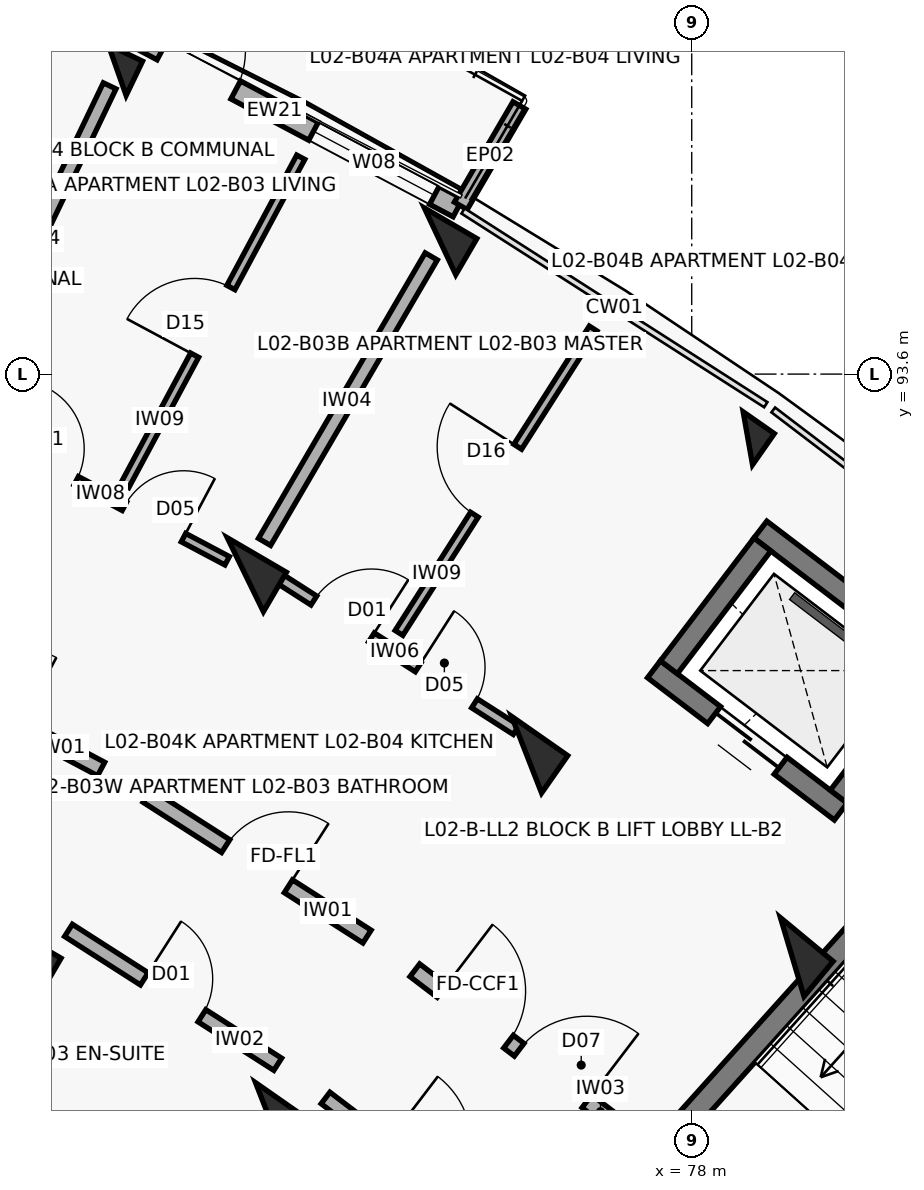
"""IFC4 building model, lengths in metres.
Left out: names, types, materials, properties, quantities, classifications, styles, units other than length and angle.
Written with IfcOpenShell. Run it as: python <this file> out.ifc"""

import sys

from ifc_helpers import new_model, si_unit, direction, frame, frame_2d, origin, origin_2d, place, context, subcontext, project, spatial, rectangle, extrude, element, fill, save


model = new_model("IFC4")
c1 = context("Model", 3, precision=1e-05, world=origin(), true_north=direction((0.0, 1.0)))
c2 = subcontext(c1, "Body", "Model", "MODEL_VIEW")
j1 = project(units=[si_unit("LENGTHUNIT", "METRE"), si_unit("PLANEANGLEUNIT", "RADIAN")], contexts=[c1])
p1 = place(None, origin())
s1 = spatial("IfcSite", under=j1, at=p1, CompositionType="ELEMENT")
p2 = place(p1, origin())
s2 = spatial("IfcBuilding", under=s1, at=p2, CompositionType="ELEMENT")
p3 = place(p2, frame((0.0, 0.0, 8.1)))
s3 = spatial("IfcBuildingStorey", under=s2, at=p3, CompositionType="ELEMENT", Elevation=8.1)
p4 = place(p3, frame((70.441, 97.6, 0.0), z_axis=(0.0, 0.0, 1.0), x_axis=(0.432085748802, 0.901832526405, 0.0)))
e1 = element("IfcColumn", 1, at=p4, inside=s3, PredefinedType="COLUMN", context=c2, shape_type="SweptSolid", body=[
    extrude(rectangle(XDim=0.5, YDim=0.5, at=origin_2d()), origin(), (0.0, 0.0, 1.0), 3.1),
])
for number, where, z_axis, x_axis in (
    (2, (69.163, 85.882, 0.0), (0.0, 0.0, 1.0), (0.504, 0.864, 0.0)),
    (3, (72.127, 90.96, 0.0), (0.0, 0.0, 1.0), (0.504, 0.864, 0.0)),
):
    element("IfcColumn", number, at=place(p3, frame(where, z_axis=z_axis, x_axis=x_axis)), inside=s3, PredefinedType="COLUMN", context=c2, shape_type="SweptSolid", body=[
        extrude(rectangle(XDim=0.6, YDim=0.9, at=origin_2d()), origin(), (0.0, 0.0, 1.0), 3.1),
    ])
p5 = place(p3, frame((74.689, 95.347, 0.0), z_axis=(0.0, 0.0, 1.0), x_axis=(0.504226211181, 0.863571611366, 0.0)))
e4 = element("IfcColumn", 4, at=p5, inside=s3, PredefinedType="COLUMN", context=c2, shape_type="SweptSolid", body=[
    extrude(rectangle(XDim=0.55, YDim=0.8, at=origin_2d()), origin(), (0.0, 0.0, 1.0), 3.1),
])
for number, where, z_axis, x_axis in (
    (5, (72.458, 83.773, 0.0), (0.0, 0.0, 1.0), (0.573, 0.82, 0.0)),
    (6, (75.828, 88.592, 0.0), (0.0, 0.0, 1.0), (0.573, 0.82, 0.0)),
):
    element("IfcColumn", number, at=place(p3, frame(where, z_axis=z_axis, x_axis=x_axis)), inside=s3, PredefinedType="COLUMN", context=c2, shape_type="SweptSolid", body=[
        extrude(rectangle(XDim=0.6, YDim=0.9, at=origin_2d()), origin(), (0.0, 0.0, 1.0), 3.1),
    ])
p6 = place(p3, frame((78.739, 92.755, 0.0), z_axis=(0.0, 0.0, 1.0), x_axis=(0.573004420611, 0.819552276527, 0.0)))
e7 = element("IfcColumn", 7, at=p6, inside=s3, PredefinedType="COLUMN", context=c2, shape_type="SweptSolid", body=[
    extrude(rectangle(XDim=0.5, YDim=0.5, at=origin_2d()), origin(), (0.0, 0.0, 1.0), 3.1),
])
p7 = place(p3, frame((79.322, 85.93, 0.0), z_axis=(0.0, 0.0, 1.0), x_axis=(0.637961754089, 0.770068049148, 0.0)))
e8 = element("IfcColumn", 8, at=p7, inside=s3, PredefinedType="COLUMN", context=c2, shape_type="SweptSolid", body=[
    extrude(rectangle(XDim=0.6, YDim=0.9, at=origin_2d()), origin(), (0.0, 0.0, 1.0), 3.1),
])
p8 = place(p3, frame((70.675, 98.042, 0.0), z_axis=(0.0, 0.0, 1.0), x_axis=(0.883448093208, -0.468529045639, 0.0)))
e9 = element("IfcWall", 9, at=p8, inside=s3, PredefinedType="SOLIDWALL", context=c2, shape_type="SweptSolid", body=[
    extrude(rectangle(XDim=4.809, YDim=0.268, at=frame_2d((2.405, 0.0))), origin(), (0.0, 0.0, 1.0), 2.25),
])
p9 = place(p8, frame((0.4, 0.0, 0.0)))
e10 = element("IfcOpeningElement", 10, at=p9, cuts=e9, PredefinedType="OPENING", context=c2, shape_type="SweptSolid", body=[
    extrude(rectangle(XDim=1.1, YDim=2.15, at=frame_2d((0.55, 1.075))), frame((0.0, 0.144, 0.0), z_axis=(0.0, -1.0, 0.0), x_axis=(1.0, 0.0, 0.0)), (0.0, 0.0, 1.0), 0.288),
])
p10 = place(p8, frame((2.659, 0.0, 0.35)))
e11 = element("IfcOpeningElement", 11, at=p10, cuts=e9, PredefinedType="OPENING", context=c2, shape_type="SweptSolid", body=[
    extrude(rectangle(XDim=1.8, YDim=1.65, at=frame_2d((0.9, 0.825))), frame((0.0, 0.144, 0.0), z_axis=(0.0, -1.0, 0.0), x_axis=(1.0, 0.0, 0.0)), (0.0, 0.0, 1.0), 0.288),
])
p11 = place(p3, frame((74.961, 95.813, 0.0), z_axis=(0.0, 0.0, 1.0), x_axis=(0.504228145431, 0.863570481985, 0.0)))
e12 = element("IfcWall", 12, at=p11, inside=s3, PredefinedType="PARAPET", context=c2, shape_type="SweptSolid", body=[
    extrude(rectangle(XDim=1.53, YDim=0.195, at=frame_2d((0.765, 0.0))), origin(), (0.0, 0.0, 1.0), 2.25),
])
p12 = place(p3, frame((77.655, 83.461, 0.0), z_axis=(0.0, 0.0, 1.0), x_axis=(0.668868253964, 0.743380964808, 0.0)))
e13 = element("IfcWall", 13, at=p12, inside=s3, PredefinedType="SHEAR", context=c2, shape_type="SweptSolid", body=[
    extrude(rectangle(XDim=7.69, YDim=0.3, at=frame_2d((3.845, 0.0))), origin(), (0.0, 0.0, 1.0), 3.1),
])
p13 = place(p3, frame((79.961, 87.844, 0.0), z_axis=(0.0, 0.0, 1.0), x_axis=(-0.795464365424, 0.606000365793, 0.0)))
e14 = element("IfcWall", 14, at=p13, inside=s3, PredefinedType="SHEAR", context=c2, shape_type="SweptSolid", body=[
    extrude(rectangle(XDim=3.09, YDim=0.28, at=frame_2d((1.545, 0.0))), origin(), (0.0, 0.0, 1.0), 3.1),
])
p14 = place(p13, frame((0.995, 0.0, 0.0)))
e15 = element("IfcOpeningElement", 15, at=p14, cuts=e14, PredefinedType="OPENING", context=c2, shape_type="SweptSolid", body=[
    extrude(rectangle(XDim=1.1, YDim=2.15, at=frame_2d((0.55, 1.075))), frame((0.0, 0.15, 0.0), z_axis=(0.0, -1.0, 0.0), x_axis=(1.0, 0.0, 0.0)), (0.0, 0.0, 1.0), 0.3),
])
p15 = place(p3, frame((81.361, 89.681, 0.0), z_axis=(0.0, 0.0, 1.0), x_axis=(-0.795502452183, 0.605950368076, 0.0)))
e16 = element("IfcWall", 16, at=p15, inside=s3, PredefinedType="SHEAR", context=c2, shape_type="SweptSolid", body=[
    extrude(rectangle(XDim=3.09, YDim=0.28, at=frame_2d((1.545, 0.0))), origin(), (0.0, 0.0, 1.0), 3.1),
])
for number, where, z_axis, x_axis in (
    (17, (79.935, 88.04, 0.0), (0.0, 0.0, 1.0), (0.606, 0.795, 0.0)),
    (18, (77.699, 89.743, 0.0), (0.0, 0.0, 1.0), (0.606, 0.795, 0.0)),
):
    element("IfcWall", number, at=place(p3, frame(where, z_axis=z_axis, x_axis=x_axis)), inside=s3, PredefinedType="SHEAR", context=c2, shape_type="SweptSolid", body=[
        extrude(rectangle(XDim=2.03, YDim=0.28, at=frame_2d((1.015, 0.0))), origin(), (0.0, 0.0, 1.0), 3.1),
    ])
p16 = place(p3, frame((67.194, 90.014, 0.0), z_axis=(0.0, 0.0, 1.0), x_axis=(0.883410853063, -0.468599258099, 0.0)))
e19 = element("IfcWall", 19, at=p16, inside=s3, PredefinedType="SOLIDWALL", context=c2, shape_type="SweptSolid", body=[
    extrude(rectangle(XDim=3.436, YDim=0.2, at=frame_2d((1.718, 0.0))), origin(), (0.0, 0.0, 1.0), 2.08),
])
p17 = place(p16, frame((1.208, 0.0, 0.0)))
e20 = element("IfcOpeningElement", 20, at=p17, cuts=e19, PredefinedType="OPENING", context=c2, shape_type="SweptSolid", body=[
    extrude(rectangle(XDim=1.02, YDim=2.15, at=frame_2d((0.51, 1.075))), frame((0.0, 0.11, 0.0), z_axis=(0.0, -1.0, 0.0), x_axis=(1.0, 0.0, 0.0)), (0.0, 0.0, 1.0), 0.22),
])
p18 = place(p3, frame((68.533, 92.923, 0.0), z_axis=(0.0, 0.0, 1.0), x_axis=(0.88341855112, -0.46858474531, 0.0)))
e21 = element("IfcWall", 21, at=p18, inside=s3, PredefinedType="PARTITIONING", context=c2, shape_type="SweptSolid", body=[
    extrude(rectangle(XDim=3.797, YDim=0.125, at=frame_2d((1.898, 0.0))), origin(), (0.0, 0.0, 1.0), 2.08),
])
p19 = place(p18, frame((0.65, 0.0, 0.0)))
e22 = element("IfcOpeningElement", 22, at=p19, cuts=e21, PredefinedType="OPENING", context=c2, shape_type="SweptSolid", body=[
    extrude(rectangle(XDim=0.9, YDim=2.1, at=frame_2d((0.45, 1.05))), frame((0.0, 0.073, 0.0), z_axis=(0.0, -1.0, 0.0), x_axis=(1.0, 0.0, 0.0)), (0.0, 0.0, 1.0), 0.145),
])
p20 = place(p18, frame((2.267, 0.0, 0.0)))
e23 = element("IfcOpeningElement", 23, at=p20, cuts=e21, PredefinedType="OPENING", context=c2, shape_type="SweptSolid", body=[
    extrude(rectangle(XDim=0.88, YDim=2.1, at=frame_2d((0.44, 1.05))), frame((0.0, 0.073, 0.0), z_axis=(0.0, -1.0, 0.0), x_axis=(1.0, 0.0, 0.0)), (0.0, 0.0, 1.0), 0.145),
])
p21 = place(p3, frame((70.541, 92.135, 0.0), z_axis=(0.0, 0.0, 1.0), x_axis=(0.472542158723, 0.881308066586, 0.0)))
e24 = element("IfcWall", 24, at=p21, inside=s3, PredefinedType="PARTITIONING", context=c2, shape_type="SweptSolid", body=[
    extrude(rectangle(XDim=4.9, YDim=0.12, at=frame_2d((2.45, 0.0))), origin(), (0.0, 0.0, 1.0), 2.08),
])
p22 = place(p21, frame((1.945, 0.0, 0.0)))
e25 = element("IfcOpeningElement", 25, at=p22, cuts=e24, PredefinedType="OPENING", context=c2, shape_type="SweptSolid", body=[
    extrude(rectangle(XDim=1.01, YDim=2.1, at=frame_2d((0.505, 1.05))), frame((0.0, 0.07, 0.0), z_axis=(0.0, -1.0, 0.0), x_axis=(1.0, 0.0, 0.0)), (0.0, 0.0, 1.0), 0.14),
])
p23 = place(p3, frame((68.462, 93.469, 0.0), z_axis=(0.0, 0.0, 1.0), x_axis=(0.432086898897, 0.901831975371, 0.0)))
e26 = element("IfcWall", 26, at=p23, inside=s3, PredefinedType="SOLIDWALL", context=c2, shape_type="SweptSolid", body=[
    extrude(rectangle(XDim=4.35, YDim=0.185, at=frame_2d((2.175, 0.0))), origin(), (0.0, 0.0, 1.0), 2.08),
])
p24 = place(p3, frame((70.834, 88.051, 0.0), z_axis=(0.0, 0.0, 1.0), x_axis=(0.842257205985, -0.539075874963, 0.0)))
e27 = element("IfcWall", 27, at=p24, inside=s3, PredefinedType="SOLIDWALL", context=c2, shape_type="SweptSolid", body=[
    extrude(rectangle(XDim=3.436, YDim=0.2, at=frame_2d((1.718, 0.0))), origin(), (0.0, 0.0, 1.0), 2.08),
])
p25 = place(p24, frame((1.228, 0.0, 0.0)))
e28 = element("IfcOpeningElement", 28, at=p25, cuts=e27, PredefinedType="OPENING", context=c2, shape_type="SweptSolid", body=[
    extrude(rectangle(XDim=0.98, YDim=2.15, at=frame_2d((0.49, 1.075))), frame((0.0, 0.11, 0.0), z_axis=(0.0, -1.0, 0.0), x_axis=(1.0, 0.0, 0.0)), (0.0, 0.0, 1.0), 0.22),
])
p26 = place(p3, frame((69.8, 86.281, 0.0), z_axis=(0.0, 0.0, 1.0), x_axis=(0.842225276846, -0.539125758095, 0.0)))
e29 = element("IfcWall", 29, at=p26, inside=s3, PredefinedType="SOLIDWALL", context=c2, shape_type="SweptSolid", body=[
    extrude(rectangle(XDim=3.269, YDim=0.19, at=frame_2d((1.634, 0.0))), origin(), (0.0, 0.0, 1.0), 2.08),
])
p27 = place(p26, frame((1.184, 0.0, 0.0)))
e30 = element("IfcOpeningElement", 30, at=p27, cuts=e29, PredefinedType="OPENING", context=c2, shape_type="SweptSolid", body=[
    extrude(rectangle(XDim=0.9, YDim=2.1, at=frame_2d((0.45, 1.05))), frame((0.0, 0.105, 0.0), z_axis=(0.0, -1.0, 0.0), x_axis=(1.0, 0.0, 0.0)), (0.0, 0.0, 1.0), 0.21),
])
p28 = place(p3, frame((72.481, 90.971, 0.0), z_axis=(0.0, 0.0, 1.0), x_axis=(0.842238809758, -0.53910461632, 0.0)))
e31 = element("IfcWall", 31, at=p28, inside=s3, PredefinedType="PARTITIONING", context=c2, shape_type="SweptSolid", body=[
    extrude(rectangle(XDim=3.81, YDim=0.14, at=frame_2d((1.905, 0.0))), origin(), (0.0, 0.0, 1.0), 2.08),
])
p29 = place(p28, frame((0.65, 0.0, 0.0)))
e32 = element("IfcOpeningElement", 32, at=p29, cuts=e31, PredefinedType="OPENING", context=c2, shape_type="SweptSolid", body=[
    extrude(rectangle(XDim=0.9, YDim=2.1, at=frame_2d((0.45, 1.05))), frame((0.0, 0.08, 0.0), z_axis=(0.0, -1.0, 0.0), x_axis=(1.0, 0.0, 0.0)), (0.0, 0.0, 1.0), 0.16),
])
p30 = place(p28, frame((2.28, 0.0, 0.0)))
e33 = element("IfcOpeningElement", 33, at=p30, cuts=e31, PredefinedType="OPENING", context=c2, shape_type="SweptSolid", body=[
    extrude(rectangle(XDim=0.88, YDim=2.1, at=frame_2d((0.44, 1.05))), frame((0.0, 0.08, 0.0), z_axis=(0.0, -1.0, 0.0), x_axis=(1.0, 0.0, 0.0)), (0.0, 0.0, 1.0), 0.16),
])
p31 = place(p3, frame((74.148, 90.195, 0.0), z_axis=(0.0, 0.0, 1.0), x_axis=(0.537779792606, 0.843085342456, 0.0)))
e34 = element("IfcWall", 34, at=p31, inside=s3, PredefinedType="PARTITIONING", context=c2, shape_type="SweptSolid", body=[
    extrude(rectangle(XDim=4.75, YDim=0.12, at=frame_2d((2.375, 0.0))), origin(), (0.0, 0.0, 1.0), 2.08),
])
p32 = place(p31, frame((1.845, 0.0, 0.0)))
e35 = element("IfcOpeningElement", 35, at=p32, cuts=e34, PredefinedType="OPENING", context=c2, shape_type="SweptSolid", body=[
    extrude(rectangle(XDim=1.06, YDim=2.1, at=frame_2d((0.53, 1.05))), frame((0.0, 0.07, 0.0), z_axis=(0.0, -1.0, 0.0), x_axis=(1.0, 0.0, 0.0)), (0.0, 0.0, 1.0), 0.14),
])
p33 = place(p3, frame((72.379, 91.392, 0.0), z_axis=(0.0, 0.0, 1.0), x_axis=(0.504216452091, 0.863577309475, 0.0)))
e36 = element("IfcWall", 36, at=p33, inside=s3, PredefinedType="SOLIDWALL", context=c2, shape_type="SweptSolid", body=[
    extrude(rectangle(XDim=4.35, YDim=0.185, at=frame_2d((2.175, 0.0))), origin(), (0.0, 0.0, 1.0), 2.08),
])
p34 = place(p3, frame((74.357, 85.756, 0.0), z_axis=(0.0, 0.0, 1.0), x_axis=(0.795498026433, -0.605956178235, 0.0)))
e37 = element("IfcWall", 37, at=p34, inside=s3, PredefinedType="SOLIDWALL", context=c2, shape_type="SweptSolid", body=[
    extrude(rectangle(XDim=3.296, YDim=0.21, at=frame_2d((1.648, 0.0))), origin(), (0.0, 0.0, 1.0), 2.08),
])
p35 = place(p34, frame((0.45, 0.0, 0.0)))
e38 = element("IfcOpeningElement", 38, at=p35, cuts=e37, PredefinedType="OPENING", context=c2, shape_type="SweptSolid", body=[
    extrude(rectangle(XDim=1.1, YDim=2.15, at=frame_2d((0.55, 1.075))), frame((0.0, 0.115, 0.0), z_axis=(0.0, -1.0, 0.0), x_axis=(1.0, 0.0, 0.0)), (0.0, 0.0, 1.0), 0.23),
])
p36 = place(p34, frame((1.726, 0.0, 0.0)))
e39 = element("IfcOpeningElement", 39, at=p36, cuts=e37, PredefinedType="OPENING", context=c2, shape_type="SweptSolid", body=[
    extrude(rectangle(XDim=1.12, YDim=2.15, at=frame_2d((0.56, 1.075))), frame((0.0, 0.115, 0.0), z_axis=(0.0, -1.0, 0.0), x_axis=(1.0, 0.0, 0.0)), (0.0, 0.0, 1.0), 0.23),
])
p37 = place(p3, frame((73.182, 84.076, 0.0), z_axis=(0.0, 0.0, 1.0), x_axis=(0.795501577908, -0.605951515838, 0.0)))
e40 = element("IfcWall", 40, at=p37, inside=s3, PredefinedType="SOLIDWALL", context=c2, shape_type="SweptSolid", body=[
    extrude(rectangle(XDim=3.129, YDim=0.19, at=frame_2d((1.564, 0.0))), origin(), (0.0, 0.0, 1.0), 2.08),
])
p38 = place(p37, frame((1.004, 0.0, 0.0)))
e41 = element("IfcOpeningElement", 41, at=p38, cuts=e40, PredefinedType="OPENING", context=c2, shape_type="SweptSolid", body=[
    extrude(rectangle(XDim=1.12, YDim=2.15, at=frame_2d((0.56, 1.075))), frame((0.0, 0.105, 0.0), z_axis=(0.0, -1.0, 0.0), x_axis=(1.0, 0.0, 0.0)), (0.0, 0.0, 1.0), 0.21),
])
p39 = place(p9, origin())
e42 = element("IfcDoor", 42, at=p39, inside=s3, OperationType="SINGLE_SWING_LEFT", PredefinedType="DOOR", context=c2, shape_type="SweptSolid", body=[
    extrude(rectangle(XDim=1.1, YDim=2.15, at=frame_2d((0.55, 1.075))), frame((0.0, 0.025, 0.0), z_axis=(0.0, -1.0, 0.0), x_axis=(1.0, 0.0, 0.0)), (0.0, 0.0, 1.0), 0.05),
])
fill(e10, e42)
p40 = place(p10, origin())
e43 = element("IfcWindow", 43, at=p40, inside=s3, PartitioningType="TRIPLE_PANEL_VERTICAL", PredefinedType="WINDOW", context=c2, shape_type="SweptSolid", body=[
    extrude(rectangle(XDim=1.8, YDim=1.65, at=frame_2d((0.9, 0.825))), frame((0.0, 0.03, 0.0), z_axis=(0.0, -1.0, 0.0), x_axis=(1.0, 0.0, 0.0)), (0.0, 0.0, 1.0), 0.06),
])
fill(e11, e43)
p41 = place(p14, origin())
e44 = element("IfcDoor", 44, at=p41, inside=s3, OperationType="DOUBLE_DOOR_SLIDING", PredefinedType="DOOR", context=c2, shape_type="SweptSolid", body=[
    extrude(rectangle(XDim=1.1, YDim=2.15, at=frame_2d((0.55, 1.075))), frame((0.0, 0.025, 0.0), z_axis=(0.0, -1.0, 0.0), x_axis=(1.0, 0.0, 0.0)), (0.0, 0.0, 1.0), 0.05),
])
fill(e15, e44)
p42 = place(p19, origin())
e45 = element("IfcDoor", 45, at=p42, inside=s3, OperationType="SINGLE_SWING_LEFT", PredefinedType="DOOR", context=c2, shape_type="SweptSolid", body=[
    extrude(rectangle(XDim=0.9, YDim=2.1, at=frame_2d((0.45, 1.05))), frame((0.0, 0.025, 0.0), z_axis=(0.0, -1.0, 0.0), x_axis=(1.0, 0.0, 0.0)), (0.0, 0.0, 1.0), 0.05),
])
fill(e22, e45)
p43 = place(p20, origin())
e46 = element("IfcDoor", 46, at=p43, inside=s3, OperationType="SINGLE_SWING_RIGHT", PredefinedType="DOOR", context=c2, shape_type="SweptSolid", body=[
    extrude(rectangle(XDim=0.88, YDim=2.1, at=frame_2d((0.44, 1.05))), frame((0.0, 0.025, 0.0), z_axis=(0.0, -1.0, 0.0), x_axis=(1.0, 0.0, 0.0)), (0.0, 0.0, 1.0), 0.05),
])
fill(e23, e46)
p44 = place(p22, origin())
e47 = element("IfcDoor", 47, at=p44, inside=s3, OperationType="SINGLE_SWING_LEFT", PredefinedType="DOOR", context=c2, shape_type="SweptSolid", body=[
    extrude(rectangle(XDim=1.01, YDim=2.1, at=frame_2d((0.505, 1.05))), frame((0.0, 0.025, 0.0), z_axis=(0.0, -1.0, 0.0), x_axis=(1.0, 0.0, 0.0)), (0.0, 0.0, 1.0), 0.05),
])
fill(e25, e47)
p45 = place(p25, origin())
e48 = element("IfcDoor", 48, at=p45, inside=s3, OperationType="SINGLE_SWING_RIGHT", PredefinedType="DOOR", context=c2, shape_type="SweptSolid", body=[
    extrude(rectangle(XDim=0.98, YDim=2.15, at=frame_2d((0.49, 1.075))), frame((0.0, 0.025, 0.0), z_axis=(0.0, -1.0, 0.0), x_axis=(1.0, 0.0, 0.0)), (0.0, 0.0, 1.0), 0.05),
])
fill(e28, e48)
p46 = place(p27, origin())
e49 = element("IfcDoor", 49, at=p46, inside=s3, OperationType="SINGLE_SWING_LEFT", PredefinedType="DOOR", context=c2, shape_type="SweptSolid", body=[
    extrude(rectangle(XDim=0.9, YDim=2.1, at=frame_2d((0.45, 1.05))), frame((0.0, 0.025, 0.0), z_axis=(0.0, -1.0, 0.0), x_axis=(1.0, 0.0, 0.0)), (0.0, 0.0, 1.0), 0.05),
])
fill(e30, e49)
p47 = place(p29, origin())
e50 = element("IfcDoor", 50, at=p47, inside=s3, OperationType="SINGLE_SWING_RIGHT", PredefinedType="DOOR", context=c2, shape_type="SweptSolid", body=[
    extrude(rectangle(XDim=0.9, YDim=2.1, at=frame_2d((0.45, 1.05))), frame((0.0, 0.025, 0.0), z_axis=(0.0, -1.0, 0.0), x_axis=(1.0, 0.0, 0.0)), (0.0, 0.0, 1.0), 0.05),
])
fill(e32, e50)
p48 = place(p30, origin())
e51 = element("IfcDoor", 51, at=p48, inside=s3, OperationType="SINGLE_SWING_LEFT", PredefinedType="DOOR", context=c2, shape_type="SweptSolid", body=[
    extrude(rectangle(XDim=0.88, YDim=2.1, at=frame_2d((0.44, 1.05))), frame((0.0, 0.025, 0.0), z_axis=(0.0, -1.0, 0.0), x_axis=(1.0, 0.0, 0.0)), (0.0, 0.0, 1.0), 0.05),
])
fill(e33, e51)
p49 = place(p32, origin())
e52 = element("IfcDoor", 52, at=p49, inside=s3, OperationType="SINGLE_SWING_RIGHT", PredefinedType="DOOR", context=c2, shape_type="SweptSolid", body=[
    extrude(rectangle(XDim=1.06, YDim=2.1, at=frame_2d((0.53, 1.05))), frame((0.0, 0.025, 0.0), z_axis=(0.0, -1.0, 0.0), x_axis=(1.0, 0.0, 0.0)), (0.0, 0.0, 1.0), 0.05),
])
fill(e35, e52)
p50 = place(p35, origin())
e53 = element("IfcDoor", 53, at=p50, inside=s3, OperationType="SINGLE_SWING_LEFT", PredefinedType="DOOR", context=c2, shape_type="SweptSolid", body=[
    extrude(rectangle(XDim=1.1, YDim=2.15, at=frame_2d((0.55, 1.075))), frame((0.0, 0.025, 0.0), z_axis=(0.0, -1.0, 0.0), x_axis=(1.0, 0.0, 0.0)), (0.0, 0.0, 1.0), 0.05),
])
fill(e38, e53)
p51 = place(p36, origin())
e54 = element("IfcDoor", 54, at=p51, inside=s3, OperationType="SINGLE_SWING_RIGHT", PredefinedType="DOOR", context=c2, shape_type="SweptSolid", body=[
    extrude(rectangle(XDim=1.12, YDim=2.15, at=frame_2d((0.56, 1.075))), frame((0.0, 0.025, 0.0), z_axis=(0.0, -1.0, 0.0), x_axis=(1.0, 0.0, 0.0)), (0.0, 0.0, 1.0), 0.05),
])
fill(e39, e54)
save(model, sys.argv[1])
